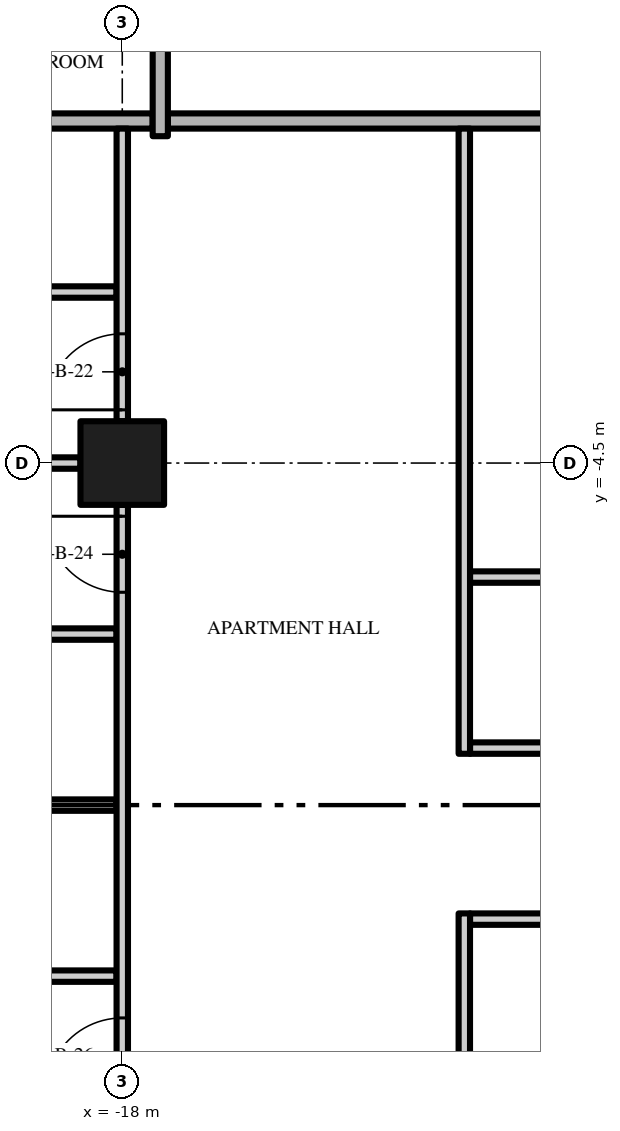
"""IFC4 building model, lengths in metres.
Left out: names, types, materials, properties, quantities, classifications, styles, units other than length and angle.
Written with IfcOpenShell. Run it as: python <this file> out.ifc"""

import sys

from ifc_helpers import new_model, si_unit, direction, frame, frame_2d, origin, origin_2d, place, context, subcontext, project, spatial, rectangle, extrude, element, fill, save


model = new_model("IFC4")
c1 = context("Model", 3, precision=1e-05, world=origin(), true_north=direction((0.0, 1.0)))
c2 = subcontext(c1, "Body", "Model", "MODEL_VIEW")
j1 = project(units=[si_unit("LENGTHUNIT", "METRE"), si_unit("PLANEANGLEUNIT", "RADIAN")], contexts=[c1])
p1 = place(None, origin())
s1 = spatial("IfcSite", under=j1, at=p1, CompositionType="ELEMENT")
p2 = place(p1, origin())
s2 = spatial("IfcBuilding", under=s1, at=p2, CompositionType="ELEMENT")
p3 = place(p2, frame((0.0, 0.0, 199.6)))
s3 = spatial("IfcBuildingStorey", under=s2, at=p3, CompositionType="ELEMENT", Elevation=199.6)
p4 = place(p3, frame((-18.0, -4.5, 0.0), z_axis=(0.0, 0.0, 1.0), x_axis=(1.0, 0.0, 0.0)))
e1 = element("IfcColumn", 1, at=p4, inside=s3, PredefinedType="COLUMN", context=c2, shape_type="SweptSolid", body=[
    extrude(rectangle(XDim=1.1, YDim=1.1, at=origin_2d()), origin(), (0.0, 0.0, 1.0), 3.5),
])
p5 = place(p3, frame((-20.925, -11.25, 0.0), z_axis=(0.0, 0.0, 1.0), x_axis=(1.0, 0.0, 0.0)))
e2 = element("IfcWall", 2, at=p5, inside=s3, PredefinedType="PARTITIONING", context=c2, shape_type="SweptSolid", body=[
    extrude(rectangle(XDim=2.85, YDim=0.15, at=frame_2d((1.425, 0.0))), origin(), (0.0, 0.0, 1.0), 3.5),
])
p6 = place(p3, frame((-13.425, -10.5, 0.0), z_axis=(0.0, 0.0, 1.0), x_axis=(1.0, 0.0, 0.0)))
e3 = element("IfcWall", 3, at=p6, inside=s3, PredefinedType="PARTITIONING", context=c2, shape_type="SweptSolid", body=[
    extrude(rectangle(XDim=4.35, YDim=0.15, at=frame_2d((2.175, 0.0))), origin(), (0.0, 0.0, 1.0), 3.5),
])
p7 = place(p3, frame((-20.925, -9.0, 0.0), z_axis=(0.0, 0.0, 1.0), x_axis=(1.0, 0.0, 0.0)))
e4 = element("IfcWall", 4, at=p7, inside=s3, PredefinedType="PARTITIONING", context=c2, shape_type="SweptSolid", body=[
    extrude(rectangle(XDim=2.85, YDim=0.15, at=frame_2d((1.425, 0.0))), origin(), (0.0, 0.0, 1.0), 3.5),
])
p8 = place(p3, frame((-13.425, -8.25, 0.0), z_axis=(0.0, 0.0, 1.0), x_axis=(1.0, 0.0, 0.0)))
e5 = element("IfcWall", 5, at=p8, inside=s3, PredefinedType="PARTITIONING", context=c2, shape_type="SweptSolid", body=[
    extrude(rectangle(XDim=4.35, YDim=0.15, at=frame_2d((2.175, 0.0))), origin(), (0.0, 0.0, 1.0), 3.5),
])
p9 = place(p8, frame((1.75, 0.0, 0.0)))
e6 = element("IfcOpeningElement", 6, at=p9, cuts=e5, PredefinedType="OPENING", context=c2, shape_type="SweptSolid", body=[
    extrude(rectangle(XDim=0.9, YDim=2.1, at=frame_2d((0.45, 1.05))), frame((0.0, 0.085, 0.0), z_axis=(0.0, -1.0, 0.0), x_axis=(1.0, 0.0, 0.0)), (0.0, 0.0, 1.0), 0.17),
])
p10 = place(p3, frame((-20.925, -6.75, 0.0), z_axis=(0.0, 0.0, 1.0), x_axis=(1.0, 0.0, 0.0)))
e7 = element("IfcWall", 7, at=p10, inside=s3, PredefinedType="PARTITIONING", context=c2, shape_type="SweptSolid", body=[
    extrude(rectangle(XDim=2.85, YDim=0.15, at=frame_2d((1.425, 0.0))), origin(), (0.0, 0.0, 1.0), 3.5),
])
p11 = place(p3, frame((-13.425, -6.0, 0.0), z_axis=(0.0, 0.0, 1.0), x_axis=(1.0, 0.0, 0.0)))
e8 = element("IfcWall", 8, at=p11, inside=s3, PredefinedType="PARTITIONING", context=c2, shape_type="SweptSolid", body=[
    extrude(rectangle(XDim=4.35, YDim=0.15, at=frame_2d((2.175, 0.0))), origin(), (0.0, 0.0, 1.0), 3.5),
])
p12 = place(p3, frame((-26.0, -4.5, 0.0), z_axis=(0.0, 0.0, 1.0), x_axis=(1.0, 0.0, 0.0)))
e9 = element("IfcWall", 9, at=p12, inside=s3, PredefinedType="PARTITIONING", context=c2, shape_type="SweptSolid", body=[
    extrude(rectangle(XDim=7.45, YDim=0.15, at=frame_2d((3.725, 0.0))), origin(), (0.0, 0.0, 1.0), 3.5),
])
p13 = place(p3, frame((-20.925, -2.25, 0.0), z_axis=(0.0, 0.0, 1.0), x_axis=(1.0, 0.0, 0.0)))
e10 = element("IfcWall", 10, at=p13, inside=s3, PredefinedType="PARTITIONING", context=c2, shape_type="SweptSolid", body=[
    extrude(rectangle(XDim=2.85, YDim=0.15, at=frame_2d((1.425, 0.0))), origin(), (0.0, 0.0, 1.0), 3.5),
])
p14 = place(p3, frame((-17.4, 0.0, 0.0), z_axis=(0.0, 0.0, 1.0), x_axis=(1.0, 0.0, 0.0)))
e11 = element("IfcWall", 11, at=p14, inside=s3, PredefinedType="PARTITIONING", context=c2, shape_type="SweptSolid", body=[
    extrude(rectangle(XDim=12.8, YDim=0.2, at=frame_2d((6.4, 0.0))), origin(), (0.0, 0.0, 1.0), 3.5),
])
p15 = place(p3, frame((-26.7, 0.0, 0.0), z_axis=(0.0, 0.0, 1.0), x_axis=(1.0, 0.0, 0.0)))
e12 = element("IfcWall", 12, at=p15, inside=s3, PredefinedType="PARTITIONING", context=c2, shape_type="SweptSolid", body=[
    extrude(rectangle(XDim=9.1, YDim=0.2, at=frame_2d((4.55, 0.0))), origin(), (0.0, 0.0, 1.0), 3.5),
])
p16 = place(p3, frame((-18.0, -12.95, 0.0), z_axis=(0.0, 0.0, 1.0), x_axis=(0.0, 1.0, 0.0)))
e13 = element("IfcWall", 13, at=p16, inside=s3, PredefinedType="PARTITIONING", context=c2, shape_type="SweptSolid", body=[
    extrude(rectangle(XDim=7.9, YDim=0.15, at=frame_2d((3.95, 0.0))), origin(), (0.0, 0.0, 1.0), 3.5),
])
p17 = place(p16, frame((6.75, 0.0, 0.0)))
e14 = element("IfcOpeningElement", 14, at=p17, cuts=e13, PredefinedType="OPENING", context=c2, shape_type="SweptSolid", body=[
    extrude(rectangle(XDim=1.0, YDim=2.4, at=frame_2d((0.5, 1.2))), frame((0.0, 0.085, 0.0), z_axis=(0.0, -1.0, 0.0), x_axis=(1.0, 0.0, 0.0)), (0.0, 0.0, 1.0), 0.17),
])
p18 = place(p16, frame((0.15, 0.0, 0.0)))
e15 = element("IfcOpeningElement", 15, at=p18, cuts=e13, PredefinedType="OPENING", context=c2, shape_type="SweptSolid", body=[
    extrude(rectangle(XDim=1.0, YDim=2.4, at=frame_2d((0.5, 1.2))), frame((0.0, 0.085, 0.0), z_axis=(0.0, -1.0, 0.0), x_axis=(1.0, 0.0, 0.0)), (0.0, 0.0, 1.0), 0.17),
])
p19 = place(p3, frame((-18.0, -3.95, 0.0), z_axis=(0.0, 0.0, 1.0), x_axis=(0.0, 1.0, 0.0)))
e16 = element("IfcWall", 16, at=p19, inside=s3, PredefinedType="PARTITIONING", context=c2, shape_type="SweptSolid", body=[
    extrude(rectangle(XDim=3.85, YDim=0.15, at=frame_2d((1.925, 0.0))), origin(), (0.0, 0.0, 1.0), 3.5),
])
p20 = place(p19, frame((0.15, 0.0, 0.0)))
e17 = element("IfcOpeningElement", 17, at=p20, cuts=e16, PredefinedType="OPENING", context=c2, shape_type="SweptSolid", body=[
    extrude(rectangle(XDim=1.0, YDim=2.4, at=frame_2d((0.5, 1.2))), frame((0.0, 0.085, 0.0), z_axis=(0.0, -1.0, 0.0), x_axis=(1.0, 0.0, 0.0)), (0.0, 0.0, 1.0), 0.17),
])
p21 = place(p3, frame((-17.5, -0.2, 0.0), z_axis=(0.0, 0.0, 1.0), x_axis=(0.0, 1.0, 0.0)))
e18 = element("IfcWall", 18, at=p21, inside=s3, PredefinedType="PARTITIONING", context=c2, shape_type="SweptSolid", body=[
    extrude(rectangle(XDim=4.15, YDim=0.2, at=frame_2d((2.075, 0.0))), origin(), (0.0, 0.0, 1.0), 3.5),
])
p22 = place(p3, frame((-13.5, -10.425, 0.0), z_axis=(0.0, 0.0, 1.0), x_axis=(0.0, -1.0, 0.0)))
e19 = element("IfcWall", 19, at=p22, inside=s3, PredefinedType="PARTITIONING", context=c2, shape_type="SweptSolid", body=[
    extrude(rectangle(XDim=11.775, YDim=0.15, at=frame_2d((5.888, 0.0))), origin(), (0.0, 0.0, 1.0), 3.5),
])
p23 = place(p22, frame((10.825, 0.0, 0.0)))
e20 = element("IfcOpeningElement", 20, at=p23, cuts=e19, PredefinedType="OPENING", context=c2, shape_type="SweptSolid", body=[
    extrude(rectangle(XDim=0.8, YDim=2.0, at=frame_2d((0.4, 1.0))), frame((0.0, 0.085, 0.0), z_axis=(0.0, -1.0, 0.0), x_axis=(1.0, 0.0, 0.0)), (0.0, 0.0, 1.0), 0.17),
])
p24 = place(p3, frame((-13.5, -8.325, 0.0), z_axis=(0.0, 0.0, 1.0), x_axis=(0.0, 1.0, 0.0)))
e21 = element("IfcWall", 21, at=p24, inside=s3, PredefinedType="PARTITIONING", context=c2, shape_type="SweptSolid", body=[
    extrude(rectangle(XDim=8.225, YDim=0.15, at=frame_2d((4.112, 0.0))), origin(), (0.0, 0.0, 1.0), 3.5),
])
p25 = place(p20, origin())
e22 = element("IfcDoor", 22, at=p25, inside=s3, OperationType="SINGLE_SWING_LEFT", PredefinedType="DOOR", context=c2, shape_type="SweptSolid", body=[
    extrude(rectangle(XDim=1.0, YDim=2.4, at=frame_2d((0.5, 1.2))), frame((0.0, 0.025, 0.0), z_axis=(0.0, -1.0, 0.0), x_axis=(1.0, 0.0, 0.0)), (0.0, 0.0, 1.0), 0.05),
])
fill(e17, e22)
p26 = place(p17, origin())
e23 = element("IfcDoor", 23, at=p26, inside=s3, OperationType="SINGLE_SWING_RIGHT", PredefinedType="DOOR", context=c2, shape_type="SweptSolid", body=[
    extrude(rectangle(XDim=1.0, YDim=2.4, at=frame_2d((0.5, 1.2))), frame((0.0, 0.025, 0.0), z_axis=(0.0, -1.0, 0.0), x_axis=(1.0, 0.0, 0.0)), (0.0, 0.0, 1.0), 0.05),
])
fill(e14, e23)
p27 = place(p18, origin())
e24 = element("IfcDoor", 24, at=p27, inside=s3, OperationType="SINGLE_SWING_LEFT", PredefinedType="DOOR", context=c2, shape_type="SweptSolid", body=[
    extrude(rectangle(XDim=1.0, YDim=2.4, at=frame_2d((0.5, 1.2))), frame((0.0, 0.025, 0.0), z_axis=(0.0, -1.0, 0.0), x_axis=(1.0, 0.0, 0.0)), (0.0, 0.0, 1.0), 0.05),
])
fill(e15, e24)
save(model, sys.argv[1])
